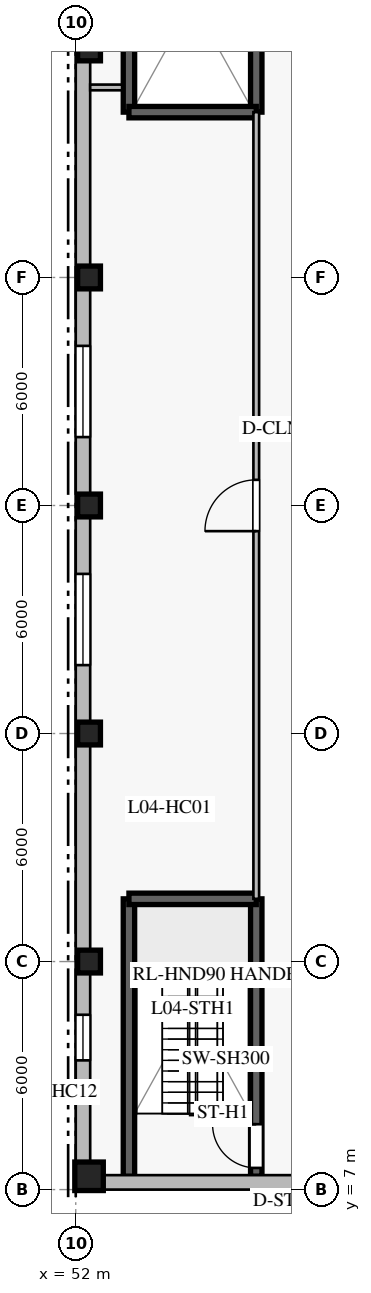
"""IFC4 building model, lengths in metres.
Left out: names, types, materials, properties, quantities, classifications, styles, units other than length and angle.
Written with IfcOpenShell. Run it as: python <this file> out.ifc"""

import sys

from ifc_helpers import new_model, si_unit, direction, frame, frame_2d, origin, origin_2d, place, context, subcontext, project, spatial, rectangle, extrude, element, fill, save


model = new_model("IFC4")
c1 = context("Model", 3, precision=1e-05, world=origin(), true_north=direction((0.0, 1.0)))
c2 = subcontext(c1, "Body", "Model", "MODEL_VIEW")
j1 = project(units=[si_unit("LENGTHUNIT", "METRE"), si_unit("PLANEANGLEUNIT", "RADIAN")], contexts=[c1])
p1 = place(None, origin())
s1 = spatial("IfcSite", under=j1, at=p1, CompositionType="ELEMENT")
p2 = place(p1, origin())
s2 = spatial("IfcBuilding", under=s1, at=p2, CompositionType="ELEMENT")
p3 = place(p2, frame((0.0, 0.0, 19.0)))
s3 = spatial("IfcBuildingStorey", under=s2, at=p3, CompositionType="ELEMENT", Elevation=19.0)
p4 = place(p3, frame((56.75, 7.35, 0.0), z_axis=(0.0, 0.0, 1.0), x_axis=(0.0, 1.0, 0.0)))
e1 = element("IfcWall", 1, at=p4, inside=s3, PredefinedType="SOLIDWALL", context=c2, shape_type="SweptSolid", body=[
    extrude(rectangle(XDim=7.3, YDim=0.3, at=frame_2d((3.65, 0.0))), origin(), (0.0, 0.0, 1.0), 4.73),
])
p5 = place(p4, frame((0.22, 0.0, 0.0)))
e2 = element("IfcOpeningElement", 2, at=p5, cuts=e1, PredefinedType="OPENING", context=c2, shape_type="SweptSolid", body=[
    extrude(rectangle(XDim=1.15, YDim=2.2, at=frame_2d((0.575, 1.1))), frame((0.0, 0.16, 0.0), z_axis=(0.0, -1.0, 0.0), x_axis=(1.0, 0.0, 0.0)), (0.0, 0.0, 1.0), 0.32),
])
p6 = place(p3, frame((53.4, 7.35, 0.0), z_axis=(0.0, 0.0, 1.0), x_axis=(0.0, 1.0, 0.0)))
e3 = element("IfcWall", 3, at=p6, inside=s3, PredefinedType="SOLIDWALL", context=c2, shape_type="SweptSolid", body=[
    extrude(rectangle(XDim=7.3, YDim=0.3, at=frame_2d((3.65, 0.0))), origin(), (0.0, 0.0, 1.0), 4.73),
])
p7 = place(p3, frame((53.4, 14.65, 0.0), z_axis=(0.0, 0.0, 1.0), x_axis=(1.0, 0.0, 0.0)))
e4 = element("IfcWall", 4, at=p7, inside=s3, PredefinedType="SOLIDWALL", context=c2, shape_type="SweptSolid", body=[
    extrude(rectangle(XDim=3.35, YDim=0.3, at=frame_2d((1.675, 0.0))), origin(), (0.0, 0.0, 1.0), 4.73),
])
p8 = place(p3, frame((56.75, 35.35, 0.0), z_axis=(0.0, 0.0, 1.0), x_axis=(0.0, 1.0, 0.0)))
e5 = element("IfcWall", 5, at=p8, inside=s3, PredefinedType="SOLIDWALL", context=c2, shape_type="SweptSolid", body=[
    extrude(rectangle(XDim=7.3, YDim=0.3, at=frame_2d((3.65, 0.0))), origin(), (0.0, 0.0, 1.0), 4.73),
])
p9 = place(p8, frame((5.92, 0.0, 0.0)))
e6 = element("IfcOpeningElement", 6, at=p9, cuts=e5, PredefinedType="OPENING", context=c2, shape_type="SweptSolid", body=[
    extrude(rectangle(XDim=1.15, YDim=2.2, at=frame_2d((0.575, 1.1))), frame((0.0, 0.16, 0.0), z_axis=(0.0, -1.0, 0.0), x_axis=(1.0, 0.0, 0.0)), (0.0, 0.0, 1.0), 0.32),
])
p10 = place(p3, frame((53.4, 35.35, 0.0), z_axis=(0.0, 0.0, 1.0), x_axis=(0.0, 1.0, 0.0)))
e7 = element("IfcWall", 7, at=p10, inside=s3, PredefinedType="SOLIDWALL", context=c2, shape_type="SweptSolid", body=[
    extrude(rectangle(XDim=7.3, YDim=0.3, at=frame_2d((3.65, 0.0))), origin(), (0.0, 0.0, 1.0), 4.73),
])
p11 = place(p3, frame((53.4, 35.35, 0.0), z_axis=(0.0, 0.0, 1.0), x_axis=(1.0, 0.0, 0.0)))
e8 = element("IfcWall", 8, at=p11, inside=s3, PredefinedType="SOLIDWALL", context=c2, shape_type="SweptSolid", body=[
    extrude(rectangle(XDim=3.35, YDim=0.3, at=frame_2d((1.675, 0.0))), origin(), (0.0, 0.0, 1.0), 4.73),
])
p12 = place(p3, frame((52.35, 7.35, 0.0), z_axis=(0.0, 0.0, 1.0), x_axis=(1.0, 0.0, 0.0)))
e9 = element("IfcColumn", 9, at=p12, inside=s3, PredefinedType="COLUMN", context=c2, shape_type="SweptSolid", body=[
    extrude(rectangle(XDim=0.75, YDim=0.75, at=origin_2d()), origin(), (0.0, 0.0, 1.0), 4.73),
])
for number, where, z_axis, x_axis in (
    (10, (52.35, 13.0, 0.0), (0.0, 0.0, 1.0), (1.0, 0.0, 0.0)),
    (11, (52.35, 19.0, 0.0), (0.0, 0.0, 1.0), (1.0, 0.0, 0.0)),
):
    element("IfcColumn", number, at=place(p3, frame(where, z_axis=z_axis, x_axis=x_axis)), inside=s3, PredefinedType="COLUMN", context=c2, shape_type="SweptSolid", body=[
        extrude(rectangle(XDim=0.6, YDim=0.6, at=origin_2d()), origin(), (0.0, 0.0, 1.0), 4.73),
    ])
for number, where, z_axis, x_axis in (
    (12, (52.35, 25.0, 0.0), (0.0, 0.0, 1.0), (1.0, 0.0, 0.0)),
    (13, (52.35, 31.0, 0.0), (0.0, 0.0, 1.0), (1.0, 0.0, 0.0)),
    (14, (52.35, 37.0, 0.0), (0.0, 0.0, 1.0), (1.0, 0.0, 0.0)),
):
    element("IfcColumn", number, at=place(p3, frame(where, z_axis=z_axis, x_axis=x_axis)), inside=s3, PredefinedType="COLUMN", context=c2, shape_type="SweptSolid", body=[
        extrude(rectangle(XDim=0.6, YDim=0.6, at=origin_2d()), origin(), (0.0, 0.0, 1.0), 4.77),
    ])
p13 = place(p3, frame((75.0, 7.19, 0.0), z_axis=(0.0, 0.0, 1.0), x_axis=(-1.0, 0.0, 0.0)))
e15 = element("IfcWall", 15, at=p13, inside=s3, PredefinedType="STANDARD", context=c2, shape_type="SweptSolid", body=[
    extrude(rectangle(XDim=23.0, YDim=0.38, at=frame_2d((11.5, 0.0))), origin(), (0.0, 0.0, 1.0), 4.73),
])
p14 = place(p13, frame((10.3, 0.0, 0.95)))
e16 = element("IfcOpeningElement", 16, at=p14, cuts=e15, PredefinedType="OPENING", context=c2, shape_type="SweptSolid", body=[
    extrude(rectangle(XDim=2.4, YDim=1.8, at=frame_2d((1.2, 0.9))), frame((0.0, 0.2, 0.0), z_axis=(0.0, -1.0, 0.0), x_axis=(1.0, 0.0, 0.0)), (0.0, 0.0, 1.0), 0.4),
])
p15 = place(p3, frame((52.19, 7.38, 0.0), z_axis=(0.0, 0.0, 1.0), x_axis=(0.0, 1.0, 0.0)))
e17 = element("IfcWall", 17, at=p15, inside=s3, PredefinedType="STANDARD", context=c2, shape_type="SweptSolid", body=[
    extrude(rectangle(XDim=35.24, YDim=0.38, at=frame_2d((17.62, 0.0))), origin(), (0.0, 0.0, 1.0), 4.73),
])
p16 = place(p15, frame((3.02, 0.0, 0.95)))
e18 = element("IfcOpeningElement", 18, at=p16, cuts=e17, PredefinedType="OPENING", context=c2, shape_type="SweptSolid", body=[
    extrude(rectangle(XDim=1.2, YDim=1.8, at=frame_2d((0.6, 0.9))), frame((0.0, 0.2, 0.0), z_axis=(0.0, -1.0, 0.0), x_axis=(1.0, 0.0, 0.0)), (0.0, 0.0, 1.0), 0.4),
])
p17 = place(p15, frame((13.42, 0.0, 0.95)))
e19 = element("IfcOpeningElement", 19, at=p17, cuts=e17, PredefinedType="OPENING", context=c2, shape_type="SweptSolid", body=[
    extrude(rectangle(XDim=2.4, YDim=1.8, at=frame_2d((1.2, 0.9))), frame((0.0, 0.2, 0.0), z_axis=(0.0, -1.0, 0.0), x_axis=(1.0, 0.0, 0.0)), (0.0, 0.0, 1.0), 0.4),
])
p18 = place(p15, frame((19.42, 0.0, 0.95)))
e20 = element("IfcOpeningElement", 20, at=p18, cuts=e17, PredefinedType="OPENING", context=c2, shape_type="SweptSolid", body=[
    extrude(rectangle(XDim=2.4, YDim=1.8, at=frame_2d((1.2, 0.9))), frame((0.0, 0.2, 0.0), z_axis=(0.0, -1.0, 0.0), x_axis=(1.0, 0.0, 0.0)), (0.0, 0.0, 1.0), 0.4),
])
p19 = place(p15, frame((31.02, 0.0, 0.95)))
e21 = element("IfcOpeningElement", 21, at=p19, cuts=e17, PredefinedType="OPENING", context=c2, shape_type="SweptSolid", body=[
    extrude(rectangle(XDim=1.2, YDim=1.8, at=frame_2d((0.6, 0.9))), frame((0.0, 0.2, 0.0), z_axis=(0.0, -1.0, 0.0), x_axis=(1.0, 0.0, 0.0)), (0.0, 0.0, 1.0), 0.4),
])
p20 = place(p3, frame((56.75, 14.65, 0.0), z_axis=(0.0, 0.0, 1.0), x_axis=(0.0, 1.0, 0.0)))
e22 = element("IfcWall", 22, at=p20, inside=s3, PredefinedType="PARTITIONING", context=c2, shape_type="SweptSolid", body=[
    extrude(rectangle(XDim=20.7, YDim=0.15, at=frame_2d((10.35, 0.0))), origin(), (0.0, 0.0, 1.0), 4.76),
])
p21 = place(p20, frame((9.675, 0.0, 0.0)))
e23 = element("IfcOpeningElement", 23, at=p21, cuts=e22, PredefinedType="OPENING", context=c2, shape_type="SweptSolid", body=[
    extrude(rectangle(XDim=1.35, YDim=2.2, at=frame_2d((0.675, 1.1))), frame((0.0, 0.085, 0.0), z_axis=(0.0, -1.0, 0.0), x_axis=(1.0, 0.0, 0.0)), (0.0, 0.0, 1.0), 0.17),
])
p22 = place(p3, frame((52.38, 36.0, 0.0), z_axis=(0.0, 0.0, 1.0), x_axis=(1.0, 0.0, 0.0)))
e24 = element("IfcWall", 24, at=p22, inside=s3, PredefinedType="PARTITIONING", context=c2, shape_type="SweptSolid", body=[
    extrude(rectangle(XDim=0.84, YDim=0.15, at=frame_2d((0.42, 0.0))), origin(), (0.0, 0.0, 1.0), 4.41),
])
p23 = place(p16, origin())
e25 = element("IfcWindow", 25, at=p23, inside=s3, PartitioningType="SINGLE_PANEL", PredefinedType="WINDOW", context=c2, shape_type="SweptSolid", body=[
    extrude(rectangle(XDim=1.2, YDim=1.8, at=frame_2d((0.6, 0.9))), frame((0.0, 0.03, 0.0), z_axis=(0.0, -1.0, 0.0), x_axis=(1.0, 0.0, 0.0)), (0.0, 0.0, 1.0), 0.06),
])
fill(e18, e25)
p24 = place(p17, origin())
e26 = element("IfcWindow", 26, at=p24, inside=s3, PartitioningType="TRIPLE_PANEL_VERTICAL", PredefinedType="WINDOW", context=c2, shape_type="SweptSolid", body=[
    extrude(rectangle(XDim=2.4, YDim=1.8, at=frame_2d((1.2, 0.9))), frame((0.0, 0.03, 0.0), z_axis=(0.0, -1.0, 0.0), x_axis=(1.0, 0.0, 0.0)), (0.0, 0.0, 1.0), 0.06),
])
fill(e19, e26)
p25 = place(p18, origin())
e27 = element("IfcWindow", 27, at=p25, inside=s3, PartitioningType="TRIPLE_PANEL_VERTICAL", PredefinedType="WINDOW", context=c2, shape_type="SweptSolid", body=[
    extrude(rectangle(XDim=2.4, YDim=1.8, at=frame_2d((1.2, 0.9))), frame((0.0, 0.03, 0.0), z_axis=(0.0, -1.0, 0.0), x_axis=(1.0, 0.0, 0.0)), (0.0, 0.0, 1.0), 0.06),
])
fill(e20, e27)
p26 = place(p5, origin())
e28 = element("IfcDoor", 28, at=p26, inside=s3, OperationType="SINGLE_SWING_RIGHT", PredefinedType="DOOR", context=c2, shape_type="SweptSolid", body=[
    extrude(rectangle(XDim=1.15, YDim=2.2, at=frame_2d((0.575, 1.1))), frame((0.0, 0.025, 0.0), z_axis=(0.0, -1.0, 0.0), x_axis=(1.0, 0.0, 0.0)), (0.0, 0.0, 1.0), 0.05),
])
fill(e2, e28)
p27 = place(p21, origin())
e29 = element("IfcDoor", 29, at=p27, inside=s3, OperationType="SINGLE_SWING_LEFT", PredefinedType="DOOR", context=c2, shape_type="SweptSolid", body=[
    extrude(rectangle(XDim=1.35, YDim=2.2, at=frame_2d((0.675, 1.1))), frame((0.0, 0.025, 0.0), z_axis=(0.0, -1.0, 0.0), x_axis=(1.0, 0.0, 0.0)), (0.0, 0.0, 1.0), 0.05),
])
fill(e23, e29)
save(model, sys.argv[1])
